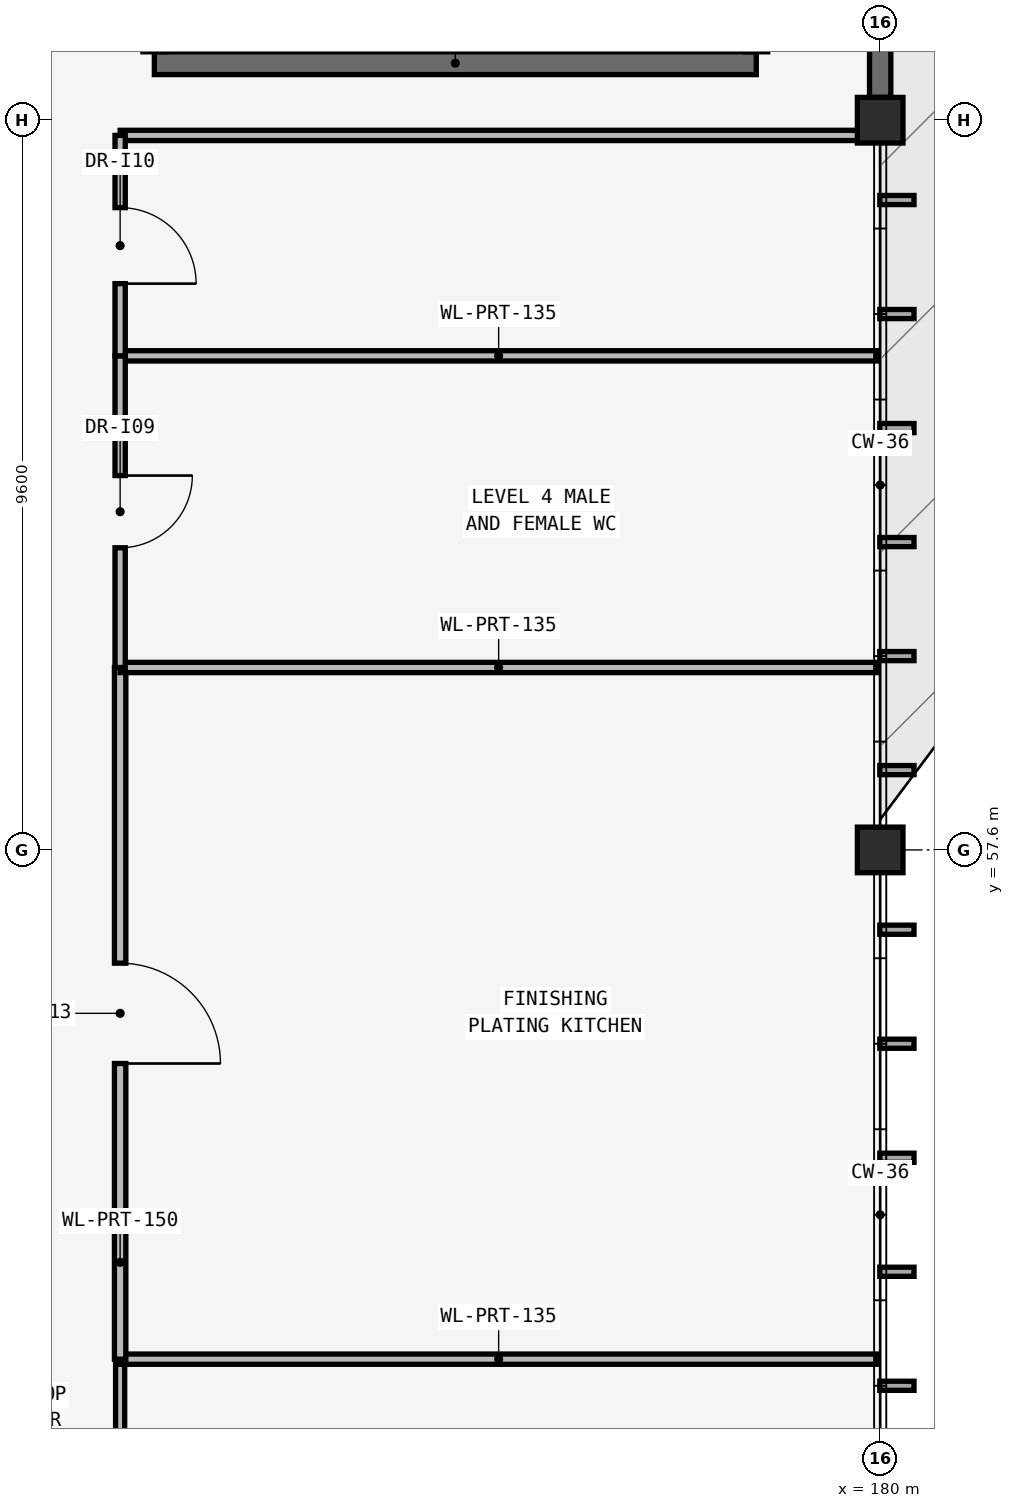
"""IFC4 building model, lengths in metres.
Left out: names, types, materials, properties, quantities, classifications, styles, units other than length and angle.
Written with IfcOpenShell. Run it as: python <this file> out.ifc"""

import sys

from ifc_helpers import new_model, si_unit, direction, frame, frame_2d, origin, origin_2d, place, context, subcontext, project, spatial, rectangle, extrude, element, fill, save


model = new_model("IFC4")
c1 = context("Model", 3, precision=1e-05, world=origin(), true_north=direction((0.0, 1.0)))
c2 = subcontext(c1, "Body", "Model", "MODEL_VIEW")
j1 = project(units=[si_unit("LENGTHUNIT", "METRE"), si_unit("PLANEANGLEUNIT", "RADIAN")], contexts=[c1])
p1 = place(None, origin())
s1 = spatial("IfcSite", under=j1, at=p1, CompositionType="ELEMENT")
p2 = place(p1, origin())
s2 = spatial("IfcBuilding", under=s1, at=p2, CompositionType="ELEMENT")
p3 = place(p2, frame((0.0, 0.0, 18.6)))
s3 = spatial("IfcBuildingStorey", under=s2, at=p3, CompositionType="ELEMENT", Elevation=18.6)
for number, where, z_axis, x_axis in (
    (1, (180.0, 57.6, 0.0), (0.0, 0.0, 1.0), (1.0, 0.0, 0.0)),
    (2, (180.0, 67.2, 0.0), (0.0, 0.0, 1.0), (1.0, 0.0, 0.0)),
):
    element("IfcColumn", number, at=place(p3, frame(where, z_axis=z_axis, x_axis=x_axis)), inside=s3, PredefinedType="COLUMN", context=c2, shape_type="SweptSolid", body=[
        extrude(rectangle(XDim=0.6, YDim=0.6, at=origin_2d()), origin(), (0.0, 0.0, 1.0), 4.2),
    ])
p4 = place(p3, frame((180.0, 67.5, 0.0), z_axis=(0.0, 0.0, 1.0), x_axis=(0.0, 1.0, 0.0)))
e3 = element("IfcWall", 3, at=p4, inside=s3, PredefinedType="SOLIDWALL", context=c2, shape_type="SweptSolid", body=[
    extrude(rectangle(XDim=9.0, YDim=0.28, at=frame_2d((4.5, 0.0))), origin(), (0.0, 0.0, 1.0), 3.95),
])
p5 = place(p3, frame((170.45, 67.95, 0.0), z_axis=(0.0, 0.0, 1.0), x_axis=(1.0, 0.0, 0.0)))
e4 = element("IfcWall", 4, at=p5, inside=s3, PredefinedType="SHEAR", context=c2, shape_type="SweptSolid", body=[
    extrude(rectangle(XDim=7.92, YDim=0.3, at=frame_2d((3.96, 0.0))), origin(), (0.0, 0.0, 1.0), 3.98),
])
p6 = place(p3, frame((170.0, 38.65, 0.0), z_axis=(0.0, 0.0, 1.0), x_axis=(0.0, 1.0, 0.0)))
e5 = element("IfcWall", 5, at=p6, inside=s3, PredefinedType="PARTITIONING", context=c2, shape_type="SweptSolid", body=[
    extrude(rectangle(XDim=12.25, YDim=0.12, at=frame_2d((6.125, 0.0))), origin(), (0.0, 0.0, 1.0), 3.98),
])
p7 = place(p6, frame((5.365, 0.0, 0.0)))
e6 = element("IfcOpeningElement", 6, at=p7, cuts=e5, PredefinedType="OPENING", context=c2, shape_type="SweptSolid", body=[
    extrude(rectangle(XDim=1.52, YDim=2.28, at=frame_2d((0.76, 1.14))), frame((0.0, 0.075, 0.0), z_axis=(0.0, -1.0, 0.0), x_axis=(1.0, 0.0, 0.0)), (0.0, 0.0, 1.0), 0.15),
])
p8 = place(p3, frame((170.0, 50.9, 0.0), z_axis=(0.0, 0.0, 1.0), x_axis=(1.0, 0.0, 0.0)))
e7 = element("IfcWall", 7, at=p8, inside=s3, PredefinedType="PARTITIONING", context=c2, shape_type="SweptSolid", body=[
    extrude(rectangle(XDim=9.96, YDim=0.135, at=frame_2d((4.98, 0.0))), origin(), (0.0, 0.0, 1.0), 3.98),
])
p9 = place(p3, frame((170.0, 50.9, 0.0), z_axis=(0.0, 0.0, 1.0), x_axis=(0.0, 1.0, 0.0)))
e8 = element("IfcWall", 8, at=p9, inside=s3, PredefinedType="PARTITIONING", context=c2, shape_type="SweptSolid", body=[
    extrude(rectangle(XDim=9.1, YDim=0.15, at=frame_2d((4.55, 0.0))), origin(), (0.0, 0.0, 1.0), 3.98),
])
p10 = place(p9, frame((3.89, 0.0, 0.0)))
e9 = element("IfcOpeningElement", 9, at=p10, cuts=e8, PredefinedType="OPENING", context=c2, shape_type="SweptSolid", body=[
    extrude(rectangle(XDim=1.32, YDim=2.15, at=frame_2d((0.66, 1.075))), frame((0.0, 0.09, 0.0), z_axis=(0.0, -1.0, 0.0), x_axis=(1.0, 0.0, 0.0)), (0.0, 0.0, 1.0), 0.18),
])
for number, where, z_axis, x_axis in (
    (10, (170.0, 60.0, 0.0), (0.0, 0.0, 1.0), (1.0, 0.0, 0.0)),
    (11, (170.0, 64.1, 0.0), (0.0, 0.0, 1.0), (1.0, 0.0, 0.0)),
):
    element("IfcWall", number, at=place(p3, frame(where, z_axis=z_axis, x_axis=x_axis)), inside=s3, PredefinedType="PARTITIONING", context=c2, shape_type="SweptSolid", body=[
        extrude(rectangle(XDim=9.96, YDim=0.135, at=frame_2d((4.98, 0.0))), origin(), (0.0, 0.0, 1.0), 3.98),
    ])
p11 = place(p3, frame((170.0, 67.0, 0.0), z_axis=(0.0, 0.0, 1.0), x_axis=(1.0, 0.0, 0.0)))
e12 = element("IfcWall", 12, at=p11, inside=s3, PredefinedType="PARTITIONING", context=c2, shape_type="SweptSolid", body=[
    extrude(rectangle(XDim=9.96, YDim=0.135, at=frame_2d((4.98, 0.0))), origin(), (0.0, 0.0, 1.0), 3.397),
])
p12 = place(p3, frame((170.0, 60.0, 0.0), z_axis=(0.0, 0.0, 1.0), x_axis=(0.0, 1.0, 0.0)))
e13 = element("IfcWall", 13, at=p12, inside=s3, PredefinedType="PARTITIONING", context=c2, shape_type="SweptSolid", body=[
    extrude(rectangle(XDim=4.1, YDim=0.135, at=frame_2d((2.05, 0.0))), origin(), (0.0, 0.0, 1.0), 3.98),
])
p13 = place(p12, frame((1.575, 0.0, 0.0)))
e14 = element("IfcOpeningElement", 14, at=p13, cuts=e13, PredefinedType="OPENING", context=c2, shape_type="SweptSolid", body=[
    extrude(rectangle(XDim=0.95, YDim=2.1, at=frame_2d((0.475, 1.05))), frame((0.0, 0.083, 0.0), z_axis=(0.0, -1.0, 0.0), x_axis=(1.0, 0.0, 0.0)), (0.0, 0.0, 1.0), 0.165),
])
p14 = place(p3, frame((170.0, 64.1, 0.0), z_axis=(0.0, 0.0, 1.0), x_axis=(0.0, 1.0, 0.0)))
e15 = element("IfcWall", 15, at=p14, inside=s3, PredefinedType="PARTITIONING", context=c2, shape_type="SweptSolid", body=[
    extrude(rectangle(XDim=2.9, YDim=0.135, at=frame_2d((1.45, 0.0))), origin(), (0.0, 0.0, 1.0), 3.98),
])
p15 = place(p14, frame((0.95, 0.0, 0.0)))
e16 = element("IfcOpeningElement", 16, at=p15, cuts=e15, PredefinedType="OPENING", context=c2, shape_type="SweptSolid", body=[
    extrude(rectangle(XDim=1.0, YDim=2.1, at=frame_2d((0.5, 1.05))), frame((0.0, 0.083, 0.0), z_axis=(0.0, -1.0, 0.0), x_axis=(1.0, 0.0, 0.0)), (0.0, 0.0, 1.0), 0.165),
])
p16 = place(p10, origin())
e17 = element("IfcDoor", 17, at=p16, inside=s3, OperationType="SINGLE_SWING_LEFT", PredefinedType="DOOR", context=c2, shape_type="SweptSolid", body=[
    extrude(rectangle(XDim=1.32, YDim=2.15, at=frame_2d((0.66, 1.075))), frame((0.0, 0.025, 0.0), z_axis=(0.0, -1.0, 0.0), x_axis=(1.0, 0.0, 0.0)), (0.0, 0.0, 1.0), 0.05),
])
fill(e9, e17)
p17 = place(p13, origin())
e18 = element("IfcDoor", 18, at=p17, inside=s3, OperationType="SINGLE_SWING_RIGHT", PredefinedType="DOOR", context=c2, shape_type="SweptSolid", body=[
    extrude(rectangle(XDim=0.95, YDim=2.1, at=frame_2d((0.475, 1.05))), frame((0.0, 0.025, 0.0), z_axis=(0.0, -1.0, 0.0), x_axis=(1.0, 0.0, 0.0)), (0.0, 0.0, 1.0), 0.05),
])
fill(e14, e18)
p18 = place(p15, origin())
e19 = element("IfcDoor", 19, at=p18, inside=s3, OperationType="SINGLE_SWING_LEFT", PredefinedType="DOOR", context=c2, shape_type="SweptSolid", body=[
    extrude(rectangle(XDim=1.0, YDim=2.1, at=frame_2d((0.5, 1.05))), frame((0.0, 0.025, 0.0), z_axis=(0.0, -1.0, 0.0), x_axis=(1.0, 0.0, 0.0)), (0.0, 0.0, 1.0), 0.05),
])
fill(e16, e19)
save(model, sys.argv[1])
